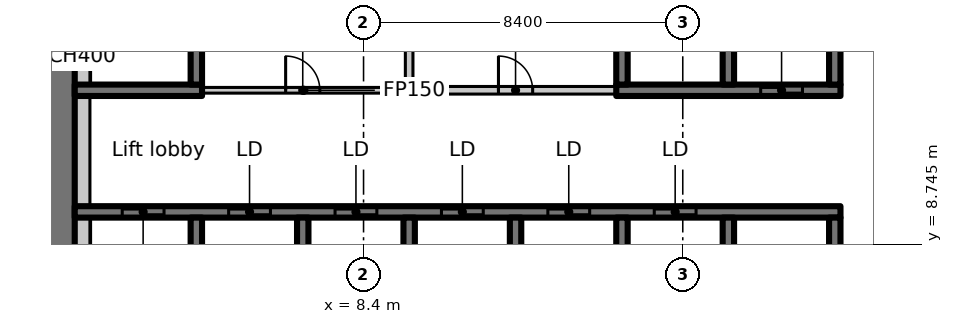
"""IFC4 building model, lengths in metres.
Left out: names, types, materials, properties, quantities, classifications, styles, units other than length and angle.
Written with IfcOpenShell. Run it as: python <this file> out.ifc"""

import sys

from ifc_helpers import new_model, si_unit, direction, frame, frame_2d, origin, place, context, subcontext, project, spatial, rectangle, extrude, element, fill, save


model = new_model("IFC4")
c1 = context("Model", 3, precision=1e-05, world=origin(), true_north=direction((0.0, 1.0)))
c2 = subcontext(c1, "Body", "Model", "MODEL_VIEW")
j1 = project(units=[si_unit("LENGTHUNIT", "METRE"), si_unit("PLANEANGLEUNIT", "RADIAN")], contexts=[c1])
p1 = place(None, origin())
s1 = spatial("IfcSite", under=j1, at=p1, CompositionType="ELEMENT")
p2 = place(p1, origin())
s2 = spatial("IfcBuilding", under=s1, at=p2, CompositionType="ELEMENT")
p3 = place(p2, frame((0.0, 0.0, 102.5)))
s3 = spatial("IfcBuildingStorey", under=s2, at=p3, CompositionType="ELEMENT", Elevation=102.5)
p4 = place(p3, frame((0.4, 7.136, 0.0), z_axis=(0.0, 0.0, 1.0), x_axis=(0.0, 1.0, 0.0)))
e1 = element("IfcWall", 1, at=p4, inside=s3, PredefinedType="SHEAR", context=c2, shape_type="SweptSolid", body=[
    extrude(rectangle(XDim=8.864, YDim=0.8, at=frame_2d((4.432, 0.0))), origin(), (0.0, 0.0, 1.0), 3.35),
])
p5 = place(p3, frame((0.8, 9.6, 0.0), z_axis=(0.0, 0.0, 1.0), x_axis=(1.0, 0.0, 0.0)))
e2 = element("IfcWall", 2, at=p5, inside=s3, PredefinedType="SHEAR", context=c2, shape_type="SweptSolid", body=[
    extrude(rectangle(XDim=20.15, YDim=0.3, at=frame_2d((10.075, 0.0))), origin(), (0.0, 0.0, 1.0), 3.35),
])
p6 = place(p5, frame((1.25, 0.0, 0.0)))
e3 = element("IfcOpeningElement", 3, at=p6, cuts=e2, PredefinedType="OPENING", context=c2, shape_type="SweptSolid", body=[
    extrude(rectangle(XDim=1.1, YDim=2.3, at=frame_2d((0.55, 1.15))), frame((0.0, 0.16, 0.0), z_axis=(0.0, -1.0, 0.0), x_axis=(1.0, 0.0, 0.0)), (0.0, 0.0, 1.0), 0.32),
])
p7 = place(p5, frame((4.05, 0.0, 0.0)))
e4 = element("IfcOpeningElement", 4, at=p7, cuts=e2, PredefinedType="OPENING", context=c2, shape_type="SweptSolid", body=[
    extrude(rectangle(XDim=1.1, YDim=2.3, at=frame_2d((0.55, 1.15))), frame((0.0, 0.16, 0.0), z_axis=(0.0, -1.0, 0.0), x_axis=(1.0, 0.0, 0.0)), (0.0, 0.0, 1.0), 0.32),
])
p8 = place(p5, frame((6.85, 0.0, 0.0)))
e5 = element("IfcOpeningElement", 5, at=p8, cuts=e2, PredefinedType="OPENING", context=c2, shape_type="SweptSolid", body=[
    extrude(rectangle(XDim=1.1, YDim=2.3, at=frame_2d((0.55, 1.15))), frame((0.0, 0.16, 0.0), z_axis=(0.0, -1.0, 0.0), x_axis=(1.0, 0.0, 0.0)), (0.0, 0.0, 1.0), 0.32),
])
p9 = place(p5, frame((9.65, 0.0, 0.0)))
e6 = element("IfcOpeningElement", 6, at=p9, cuts=e2, PredefinedType="OPENING", context=c2, shape_type="SweptSolid", body=[
    extrude(rectangle(XDim=1.1, YDim=2.3, at=frame_2d((0.55, 1.15))), frame((0.0, 0.16, 0.0), z_axis=(0.0, -1.0, 0.0), x_axis=(1.0, 0.0, 0.0)), (0.0, 0.0, 1.0), 0.32),
])
p10 = place(p5, frame((12.45, 0.0, 0.0)))
e7 = element("IfcOpeningElement", 7, at=p10, cuts=e2, PredefinedType="OPENING", context=c2, shape_type="SweptSolid", body=[
    extrude(rectangle(XDim=1.1, YDim=2.3, at=frame_2d((0.55, 1.15))), frame((0.0, 0.16, 0.0), z_axis=(0.0, -1.0, 0.0), x_axis=(1.0, 0.0, 0.0)), (0.0, 0.0, 1.0), 0.32),
])
p11 = place(p5, frame((15.25, 0.0, 0.0)))
e8 = element("IfcOpeningElement", 8, at=p11, cuts=e2, PredefinedType="OPENING", context=c2, shape_type="SweptSolid", body=[
    extrude(rectangle(XDim=1.1, YDim=2.3, at=frame_2d((0.55, 1.15))), frame((0.0, 0.16, 0.0), z_axis=(0.0, -1.0, 0.0), x_axis=(1.0, 0.0, 0.0)), (0.0, 0.0, 1.0), 0.32),
])
for number, where, z_axis, x_axis in (
    (9, (4.0, 7.15, 0.0), (0.0, 0.0, 1.0), (0.0, 1.0, 0.0)),
    (10, (6.8, 7.15, 0.0), (0.0, 0.0, 1.0), (0.0, 1.0, 0.0)),
    (11, (9.6, 7.15, 0.0), (0.0, 0.0, 1.0), (0.0, 1.0, 0.0)),
    (12, (12.4, 7.15, 0.0), (0.0, 0.0, 1.0), (0.0, 1.0, 0.0)),
    (13, (15.2, 7.15, 0.0), (0.0, 0.0, 1.0), (0.0, 1.0, 0.0)),
    (14, (18.0, 7.15, 0.0), (0.0, 0.0, 1.0), (0.0, 1.0, 0.0)),
    (15, (20.8, 7.15, 0.0), (0.0, 0.0, 1.0), (0.0, 1.0, 0.0)),
):
    element("IfcWall", number, at=place(p3, frame(where, z_axis=z_axis, x_axis=x_axis)), inside=s3, PredefinedType="SHEAR", context=c2, shape_type="SweptSolid", body=[
        extrude(rectangle(XDim=2.3, YDim=0.3, at=frame_2d((1.15, 0.0))), origin(), (0.0, 0.0, 1.0), 3.35),
    ])
p12 = place(p3, frame((0.8, 12.8, 0.0), z_axis=(0.0, 0.0, 1.0), x_axis=(1.0, 0.0, 0.0)))
e16 = element("IfcWall", 16, at=p12, inside=s3, PredefinedType="SHEAR", context=c2, shape_type="SweptSolid", body=[
    extrude(rectangle(XDim=3.35, YDim=0.3, at=frame_2d((1.675, 0.0))), origin(), (0.0, 0.0, 1.0), 3.35),
])
p13 = place(p3, frame((4.0, 12.95, 0.0), z_axis=(0.0, 0.0, 1.0), x_axis=(0.0, 1.0, 0.0)))
e17 = element("IfcWall", 17, at=p13, inside=s3, PredefinedType="SHEAR", context=c2, shape_type="SweptSolid", body=[
    extrude(rectangle(XDim=3.05, YDim=0.3, at=frame_2d((1.525, 0.0))), origin(), (0.0, 0.0, 1.0), 3.35),
])
p14 = place(p3, frame((15.05, 12.8, 0.0), z_axis=(0.0, 0.0, 1.0), x_axis=(1.0, 0.0, 0.0)))
e18 = element("IfcWall", 18, at=p14, inside=s3, PredefinedType="SHEAR", context=c2, shape_type="SweptSolid", body=[
    extrude(rectangle(XDim=5.9, YDim=0.3, at=frame_2d((2.95, 0.0))), origin(), (0.0, 0.0, 1.0), 3.35),
])
p15 = place(p14, frame((3.8, 0.0, 0.0)))
e19 = element("IfcOpeningElement", 19, at=p15, cuts=e18, PredefinedType="OPENING", context=c2, shape_type="SweptSolid", body=[
    extrude(rectangle(XDim=1.1, YDim=2.3, at=frame_2d((0.55, 1.15))), frame((0.0, 0.16, 0.0), z_axis=(0.0, -1.0, 0.0), x_axis=(1.0, 0.0, 0.0)), (0.0, 0.0, 1.0), 0.32),
])
for number, where, z_axis, x_axis in (
    (20, (15.2, 12.95, 0.0), (0.0, 0.0, 1.0), (0.0, 1.0, 0.0)),
    (21, (18.0, 12.95, 0.0), (0.0, 0.0, 1.0), (0.0, 1.0, 0.0)),
    (22, (20.8, 12.95, 0.0), (0.0, 0.0, 1.0), (0.0, 1.0, 0.0)),
):
    element("IfcWall", number, at=place(p3, frame(where, z_axis=z_axis, x_axis=x_axis)), inside=s3, PredefinedType="SHEAR", context=c2, shape_type="SweptSolid", body=[
        extrude(rectangle(XDim=3.05, YDim=0.3, at=frame_2d((1.525, 0.0))), origin(), (0.0, 0.0, 1.0), 3.35),
    ])
p16 = place(p3, frame((9.6, 15.588, 0.0), z_axis=(0.0, 0.0, 1.0), x_axis=(0.0, -1.0, 0.0)))
e23 = element("IfcWall", 23, at=p16, inside=s3, PredefinedType="PARTITIONING", context=c2, shape_type="SweptSolid", body=[
    extrude(rectangle(XDim=2.788, YDim=0.2, at=frame_2d((1.394, 0.0))), origin(), (0.0, 0.0, 1.0), 3.35),
])
p17 = place(p3, frame((9.7, 12.8, 0.0), z_axis=(0.0, 0.0, 1.0), x_axis=(1.0, 0.0, 0.0)))
e24 = element("IfcWall", 24, at=p17, inside=s3, PredefinedType="PARTITIONING", context=c2, shape_type="SweptSolid", body=[
    extrude(rectangle(XDim=5.338, YDim=0.2, at=frame_2d((2.669, 0.0))), origin(), (0.0, 0.0, 1.0), 3.35),
])
p18 = place(p17, frame((2.25, 0.0, 0.0)))
e25 = element("IfcOpeningElement", 25, at=p18, cuts=e24, PredefinedType="OPENING", context=c2, shape_type="SweptSolid", body=[
    extrude(rectangle(XDim=0.9, YDim=2.1, at=frame_2d((0.45, 1.05))), frame((0.0, 0.11, 0.0), z_axis=(0.0, -1.0, 0.0), x_axis=(1.0, 0.0, 0.0)), (0.0, 0.0, 1.0), 0.22),
])
p19 = place(p3, frame((4.162, 12.8, 0.0), z_axis=(0.0, 0.0, 1.0), x_axis=(1.0, 0.0, 0.0)))
e26 = element("IfcWall", 26, at=p19, inside=s3, PredefinedType="PARTITIONING", context=c2, shape_type="SweptSolid", body=[
    extrude(rectangle(XDim=5.338, YDim=0.15, at=frame_2d((2.669, 0.0))), origin(), (0.0, 0.0, 1.0), 3.35),
])
p20 = place(p19, frame((2.188, 0.0, 0.0)))
e27 = element("IfcOpeningElement", 27, at=p20, cuts=e26, PredefinedType="OPENING", context=c2, shape_type="SweptSolid", body=[
    extrude(rectangle(XDim=0.9, YDim=2.1, at=frame_2d((0.45, 1.05))), frame((0.0, 0.085, 0.0), z_axis=(0.0, -1.0, 0.0), x_axis=(1.0, 0.0, 0.0)), (0.0, 0.0, 1.0), 0.17),
])
p21 = place(p3, frame((1.0, 7.15, 0.0), z_axis=(0.0, 0.0, 1.0), x_axis=(0.0, 1.0, 0.0)))
e28 = element("IfcWall", 28, at=p21, inside=s3, PredefinedType="PARTITIONING", context=c2, shape_type="SweptSolid", body=[
    extrude(rectangle(XDim=2.3, YDim=0.4, at=frame_2d((1.15, 0.0))), origin(), (0.0, 0.0, 1.0), 3.35),
])
p22 = place(p3, frame((1.0, 9.75, 0.0), z_axis=(0.0, 0.0, 1.0), x_axis=(0.0, 1.0, 0.0)))
e29 = element("IfcWall", 29, at=p22, inside=s3, PredefinedType="PARTITIONING", context=c2, shape_type="SweptSolid", body=[
    extrude(rectangle(XDim=2.9, YDim=0.4, at=frame_2d((1.45, 0.0))), origin(), (0.0, 0.0, 1.0), 3.35),
])
p23 = place(p3, frame((1.0, 12.95, 0.0), z_axis=(0.0, 0.0, 1.0), x_axis=(0.0, 1.0, 0.0)))
e30 = element("IfcWall", 30, at=p23, inside=s3, PredefinedType="PARTITIONING", context=c2, shape_type="SweptSolid", body=[
    extrude(rectangle(XDim=2.65, YDim=0.4, at=frame_2d((1.325, 0.0))), origin(), (0.0, 0.0, 1.0), 3.35),
])
p24 = place(p6, origin())
e31 = element("IfcDoor", 31, at=p24, inside=s3, OperationType="SLIDING_TO_LEFT", PredefinedType="DOOR", context=c2, shape_type="SweptSolid", body=[
    extrude(rectangle(XDim=1.1, YDim=2.3, at=frame_2d((0.55, 1.15))), frame((0.0, 0.025, 0.0), z_axis=(0.0, -1.0, 0.0), x_axis=(1.0, 0.0, 0.0)), (0.0, 0.0, 1.0), 0.05),
])
fill(e3, e31)
p25 = place(p7, origin())
e32 = element("IfcDoor", 32, at=p25, inside=s3, OperationType="SLIDING_TO_LEFT", PredefinedType="DOOR", context=c2, shape_type="SweptSolid", body=[
    extrude(rectangle(XDim=1.1, YDim=2.3, at=frame_2d((0.55, 1.15))), frame((0.0, 0.025, 0.0), z_axis=(0.0, -1.0, 0.0), x_axis=(1.0, 0.0, 0.0)), (0.0, 0.0, 1.0), 0.05),
])
fill(e4, e32)
p26 = place(p8, origin())
e33 = element("IfcDoor", 33, at=p26, inside=s3, OperationType="SLIDING_TO_LEFT", PredefinedType="DOOR", context=c2, shape_type="SweptSolid", body=[
    extrude(rectangle(XDim=1.1, YDim=2.3, at=frame_2d((0.55, 1.15))), frame((0.0, 0.025, 0.0), z_axis=(0.0, -1.0, 0.0), x_axis=(1.0, 0.0, 0.0)), (0.0, 0.0, 1.0), 0.05),
])
fill(e5, e33)
p27 = place(p9, origin())
e34 = element("IfcDoor", 34, at=p27, inside=s3, OperationType="SLIDING_TO_LEFT", PredefinedType="DOOR", context=c2, shape_type="SweptSolid", body=[
    extrude(rectangle(XDim=1.1, YDim=2.3, at=frame_2d((0.55, 1.15))), frame((0.0, 0.025, 0.0), z_axis=(0.0, -1.0, 0.0), x_axis=(1.0, 0.0, 0.0)), (0.0, 0.0, 1.0), 0.05),
])
fill(e6, e34)
p28 = place(p10, origin())
e35 = element("IfcDoor", 35, at=p28, inside=s3, OperationType="SLIDING_TO_LEFT", PredefinedType="DOOR", context=c2, shape_type="SweptSolid", body=[
    extrude(rectangle(XDim=1.1, YDim=2.3, at=frame_2d((0.55, 1.15))), frame((0.0, 0.025, 0.0), z_axis=(0.0, -1.0, 0.0), x_axis=(1.0, 0.0, 0.0)), (0.0, 0.0, 1.0), 0.05),
])
fill(e7, e35)
p29 = place(p11, origin())
e36 = element("IfcDoor", 36, at=p29, inside=s3, OperationType="SLIDING_TO_LEFT", PredefinedType="DOOR", context=c2, shape_type="SweptSolid", body=[
    extrude(rectangle(XDim=1.1, YDim=2.3, at=frame_2d((0.55, 1.15))), frame((0.0, 0.025, 0.0), z_axis=(0.0, -1.0, 0.0), x_axis=(1.0, 0.0, 0.0)), (0.0, 0.0, 1.0), 0.05),
])
fill(e8, e36)
p30 = place(p15, origin())
e37 = element("IfcDoor", 37, at=p30, inside=s3, OperationType="SLIDING_TO_LEFT", PredefinedType="DOOR", context=c2, shape_type="SweptSolid", body=[
    extrude(rectangle(XDim=1.1, YDim=2.3, at=frame_2d((0.55, 1.15))), frame((0.0, 0.025, 0.0), z_axis=(0.0, -1.0, 0.0), x_axis=(1.0, 0.0, 0.0)), (0.0, 0.0, 1.0), 0.05),
])
fill(e19, e37)
p31 = place(p20, origin())
e38 = element("IfcDoor", 38, at=p31, inside=s3, OperationType="SINGLE_SWING_LEFT", PredefinedType="DOOR", context=c2, shape_type="SweptSolid", body=[
    extrude(rectangle(XDim=0.9, YDim=2.1, at=frame_2d((0.45, 1.05))), frame((0.0, 0.025, 0.0), z_axis=(0.0, -1.0, 0.0), x_axis=(1.0, 0.0, 0.0)), (0.0, 0.0, 1.0), 0.05),
])
fill(e27, e38)
p32 = place(p18, origin())
e39 = element("IfcDoor", 39, at=p32, inside=s3, OperationType="SINGLE_SWING_RIGHT", PredefinedType="DOOR", context=c2, shape_type="SweptSolid", body=[
    extrude(rectangle(XDim=0.9, YDim=2.1, at=frame_2d((0.45, 1.05))), frame((0.0, 0.025, 0.0), z_axis=(0.0, -1.0, 0.0), x_axis=(1.0, 0.0, 0.0)), (0.0, 0.0, 1.0), 0.05),
])
fill(e25, e39)
save(model, sys.argv[1])
